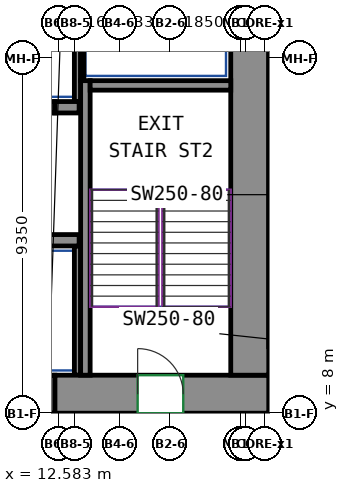
"""IFC4 building model, lengths in metres.
Left out: names, types, materials, properties, quantities, classifications, styles, units other than length and angle.
Written with IfcOpenShell. Run it as: python <this file> out.ifc"""

import sys

from ifc_helpers import new_model, si_unit, direction, frame, frame_2d, origin, place, context, subcontext, project, spatial, rectangle, extrude, source, transform, mapped, element, fill, save


model = new_model("IFC4")
c1 = context("Model", 3, precision=1e-05, world=origin(), true_north=direction((0.0, 1.0)))
c2 = subcontext(c1, "Body", "Model", "MODEL_VIEW")
j1 = project(units=[si_unit("LENGTHUNIT", "METRE"), si_unit("PLANEANGLEUNIT", "RADIAN")], contexts=[c1])
p1 = place(None, origin())
s1 = spatial("IfcSite", under=j1, at=p1, CompositionType="ELEMENT")
p2 = place(p1, origin())
s2 = spatial("IfcBuilding", under=s1, at=p2, CompositionType="ELEMENT")
p3 = place(p2, frame((0.0, 0.0, 47.0)))
s3 = spatial("IfcBuildingStorey", under=s2, at=p3, CompositionType="ELEMENT", Elevation=47.0)
m1 = source(origin(), c2, "Body", "SweptSolid", [
    extrude(rectangle(XDim=5.63, YDim=1.0, at=frame_2d((2.815, 0.0))), origin(), (0.0, 0.0, 1.0), 3.72),
])
p4 = place(p3, frame((12.47, 8.5, 0.0), z_axis=(0.0, 0.0, 1.0), x_axis=(1.0, 0.0, 0.0)))
e1 = element("IfcWall", 1, at=p4, inside=s3, PredefinedType="SHEAR", context=c2, shape_type="MappedRepresentation", body=[
    mapped(m1, transform((0.0, 0.0, 0.0))),
])
p5 = place(p4, frame((2.18, 0.0, 0.0)))
e2 = element("IfcOpeningElement", 2, at=p5, cuts=e1, PredefinedType="OPENING", context=c2, shape_type="SweptSolid", body=[
    extrude(rectangle(XDim=1.2, YDim=2.1, at=frame_2d((0.6, 1.05))), frame((0.0, 0.51, 0.0), z_axis=(0.0, -1.0, 0.0), x_axis=(1.0, 0.0, 0.0)), (0.0, 0.0, 1.0), 1.02),
])
m2 = source(origin(), c2, "Body", "SweptSolid", [
    extrude(rectangle(XDim=12.0, YDim=1.0, at=frame_2d((6.0, 0.0))), origin(), (0.0, 0.0, 1.0), 3.72),
])
p6 = place(p3, frame((17.6, 9.0, 0.0), z_axis=(0.0, 0.0, 1.0), x_axis=(0.0, 1.0, 0.0)))
e3 = element("IfcWall", 3, at=p6, inside=s3, PredefinedType="SHEAR", context=c2, shape_type="MappedRepresentation", body=[
    mapped(m2, transform((0.0, 0.0, 0.0))),
])
m3 = source(origin(), c2, "Body", "SweptSolid", [
    extrude(rectangle(XDim=7.75, YDim=0.25, at=frame_2d((3.875, 0.0))), origin(), (0.0, 0.0, 1.0), 3.72),
])
p7 = place(p3, frame((13.275, 9.0, 0.0), z_axis=(0.0, 0.0, 1.0), x_axis=(0.0, 1.0, 0.0)))
e4 = element("IfcWall", 4, at=p7, inside=s3, PredefinedType="SHEAR", context=c2, shape_type="MappedRepresentation", body=[
    mapped(m3, transform((0.0, 0.0, 0.0))),
])
m4 = source(origin(), c2, "Body", "SweptSolid", [
    extrude(rectangle(XDim=3.7, YDim=0.25, at=frame_2d((1.85, 0.0))), origin(), (0.0, 0.0, 1.0), 3.72),
])
p8 = place(p3, frame((13.4, 16.625, 0.0), z_axis=(0.0, 0.0, 1.0), x_axis=(1.0, 0.0, 0.0)))
e5 = element("IfcWall", 5, at=p8, inside=s3, PredefinedType="SHEAR", context=c2, shape_type="MappedRepresentation", body=[
    mapped(m4, transform((0.0, 0.0, 0.0))),
])
m5 = source(origin(), c2, "Body", "SweptSolid", [
    extrude(rectangle(XDim=2.82, YDim=0.3, at=frame_2d((1.41, 0.0))), origin(), (0.0, 0.0, 1.0), 3.72),
])
p9 = place(p3, frame((10.29, 12.55, 0.0), z_axis=(0.0, 0.0, 1.0), x_axis=(1.0, 0.0, 0.0)))
e6 = element("IfcWall", 6, at=p9, inside=s3, PredefinedType="SHEAR", context=c2, shape_type="MappedRepresentation", body=[
    mapped(m5, transform((0.0, 0.0, 0.0))),
])
m6 = source(origin(), c2, "Body", "SweptSolid", [
    extrude(rectangle(XDim=0.64, YDim=0.3, at=frame_2d((0.32, 0.0))), origin(), (0.0, 0.0, 1.0), 3.72),
])
p10 = place(p3, frame((12.47, 16.05, 0.0), z_axis=(0.0, 0.0, 1.0), x_axis=(1.0, 0.0, 0.0)))
e7 = element("IfcWall", 7, at=p10, inside=s3, PredefinedType="SHEAR", context=c2, shape_type="MappedRepresentation", body=[
    mapped(m6, transform((0.0, 0.0, 0.0))),
])
m7 = source(origin(), c2, "Body", "SweptSolid", [
    extrude(rectangle(XDim=1.4, YDim=0.3, at=frame_2d((0.7, 0.0))), origin(), (0.0, 0.0, 1.0), 3.72),
])
p11 = place(p3, frame((11.07, 16.05, 0.0), z_axis=(0.0, 0.0, 1.0), x_axis=(1.0, 0.0, 0.0)))
e8 = element("IfcWall", 8, at=p11, inside=s3, PredefinedType="PARTITIONING", context=c2, shape_type="MappedRepresentation", body=[
    mapped(m7, transform((0.0, 0.0, 0.0))),
])
p12 = place(p11, frame((0.15, 0.0, 0.0)))
e9 = element("IfcOpeningElement", 9, at=p12, cuts=e8, PredefinedType="OPENING", context=c2, shape_type="SweptSolid", body=[
    extrude(rectangle(XDim=1.1, YDim=2.1, at=frame_2d((0.55, 1.05))), frame((0.0, 0.16, 0.0), z_axis=(0.0, -1.0, 0.0), x_axis=(1.0, 0.0, 0.0)), (0.0, 0.0, 1.0), 0.32),
])
m8 = source(origin(), c2, "Body", "SweptSolid", [
    extrude(rectangle(XDim=3.275, YDim=0.165, at=frame_2d((1.638, 0.0))), origin(), (0.0, 0.0, 1.0), 3.72),
])
p13 = place(p3, frame((13.067, 16.2, 0.0), z_axis=(0.0, 0.0, 1.0), x_axis=(0.0, 1.0, 0.0)))
e10 = element("IfcWall", 10, at=p13, inside=s3, PredefinedType="PARTITIONING", context=c2, shape_type="MappedRepresentation", body=[
    mapped(m8, transform((0.0, 0.0, 0.0))),
])
m9 = source(origin(), c2, "Body", "SweptSolid", [
    extrude(rectangle(XDim=2.725, YDim=0.085, at=frame_2d((1.363, 0.0))), origin(), (0.0, 0.0, 1.0), 3.72),
])
p14 = place(p3, frame((13.192, 16.75, 0.0), z_axis=(0.0, 0.0, 1.0), x_axis=(0.0, 1.0, 0.0)))
e11 = element("IfcWall", 11, at=p14, inside=s3, PredefinedType="PARTITIONING", context=c2, shape_type="MappedRepresentation", body=[
    mapped(m9, transform((0.0, 0.0, 0.0))),
])
m10 = source(origin(), c2, "Body", "SweptSolid", [
    extrude(rectangle(XDim=3.4, YDim=0.165, at=frame_2d((1.7, 0.0))), origin(), (0.0, 0.0, 1.0), 3.72),
])
p15 = place(p3, frame((13.067, 9.0, 0.0), z_axis=(0.0, 0.0, 1.0), x_axis=(0.0, 1.0, 0.0)))
e12 = element("IfcWall", 12, at=p15, inside=s3, PredefinedType="PARTITIONING", context=c2, shape_type="MappedRepresentation", body=[
    mapped(m10, transform((0.0, 0.0, 0.0))),
])
m11 = source(origin(), c2, "Body", "SweptSolid", [
    extrude(rectangle(XDim=1.4, YDim=1.0, at=frame_2d((0.7, 0.0))), origin(), (0.0, 0.0, 1.0), 2.7),
])
p16 = place(p3, frame((11.07, 8.5, 0.0), z_axis=(0.0, 0.0, 1.0), x_axis=(1.0, 0.0, 0.0)))
e13 = element("IfcWall", 13, at=p16, inside=s3, PredefinedType="PARTITIONING", context=c2, shape_type="MappedRepresentation", body=[
    mapped(m11, transform((0.0, 0.0, 0.0))),
])
p17 = place(p16, frame((0.25, 0.0, 0.0)))
e14 = element("IfcOpeningElement", 14, at=p17, cuts=e13, PredefinedType="OPENING", context=c2, shape_type="SweptSolid", body=[
    extrude(rectangle(XDim=0.9, YDim=2.1, at=frame_2d((0.45, 1.05))), frame((0.0, 0.51, 0.0), z_axis=(0.0, -1.0, 0.0), x_axis=(1.0, 0.0, 0.0)), (0.0, 0.0, 1.0), 1.02),
])
p18 = place(p5, origin())
e15 = element("IfcDoor", 15, at=p18, inside=s3, OperationType="DOUBLE_DOOR_SINGLE_SWING", PredefinedType="DOOR", context=c2, shape_type="SweptSolid", body=[
    extrude(rectangle(XDim=1.2, YDim=2.1, at=frame_2d((0.6, 1.05))), frame((0.0, 0.405, 0.0), z_axis=(0.0, -1.0, 0.0), x_axis=(1.0, 0.0, 0.0)), (0.0, 0.0, 1.0), 0.05),
])
fill(e2, e15)
save(model, sys.argv[1])
